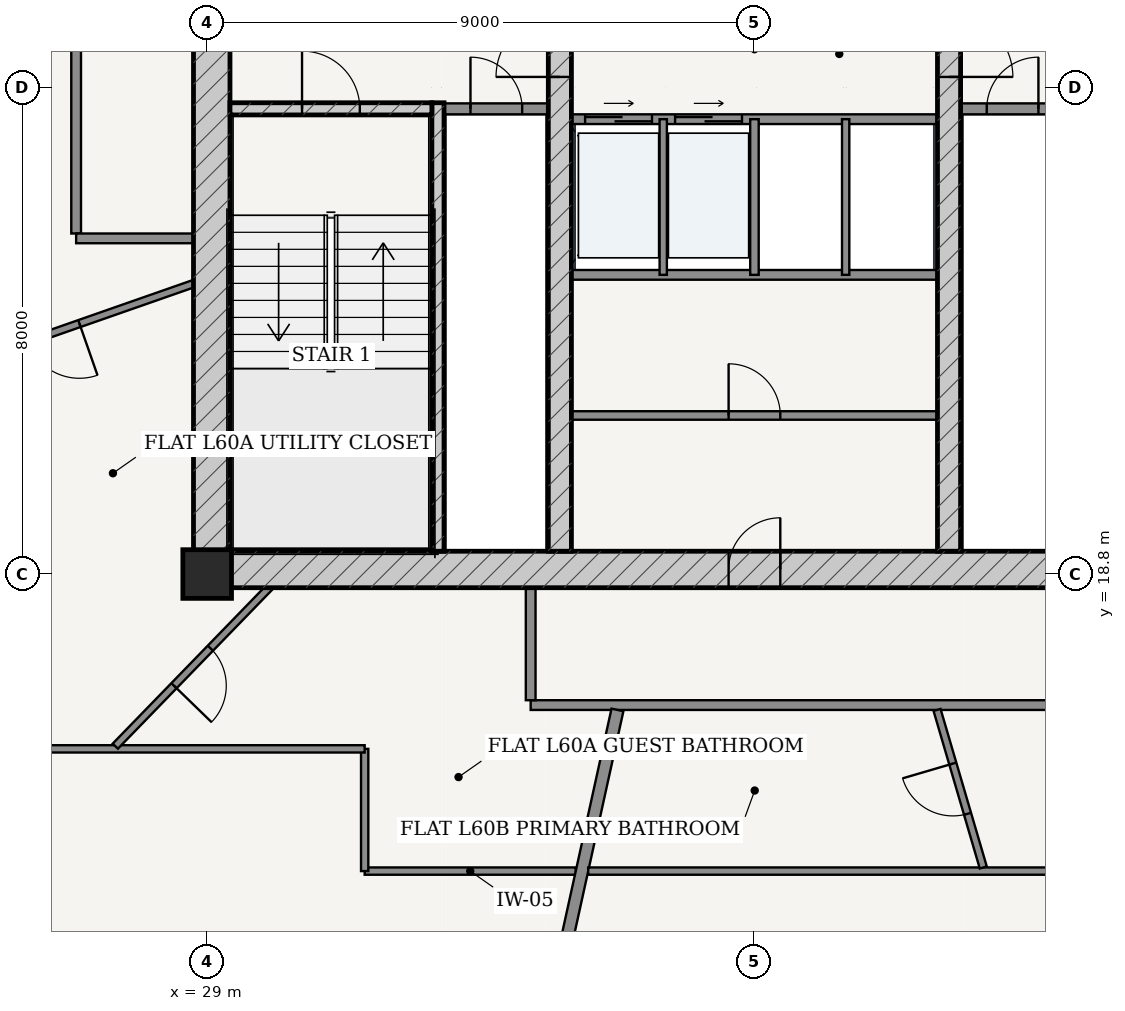
"""IFC4 building model, lengths in metres.
Left out: names, types, materials, properties, quantities, classifications, styles, units other than length and angle.
Written with IfcOpenShell. Run it as: python <this file> out.ifc"""

import sys

from ifc_helpers import new_model, si_unit, direction, frame, frame_2d, origin, origin_2d, place, context, subcontext, project, spatial, rectangle, extrude, source, transform, mapped, element, fill, save


model = new_model("IFC4")
c1 = context("Model", 3, precision=1e-05, world=origin(), true_north=direction((-0.2419218956, 0.970295726276)))
c2 = subcontext(c1, "Body", "Model", "MODEL_VIEW")
j1 = project(units=[si_unit("LENGTHUNIT", "METRE"), si_unit("PLANEANGLEUNIT", "RADIAN")], contexts=[c1])
p1 = place(None, origin())
s1 = spatial("IfcSite", under=j1, at=p1, CompositionType="ELEMENT")
p2 = place(p1, origin())
s2 = spatial("IfcBuilding", under=s1, at=p2, CompositionType="ELEMENT")
p3 = place(p2, frame((0.0, 0.0, 228.2)))
s3 = spatial("IfcBuildingStorey", under=s2, at=p3, CompositionType="ELEMENT", Elevation=228.2)
p4 = place(p3, frame((29.0, 18.8, 0.0), z_axis=(0.0, 0.0, 1.0), x_axis=(1.0, 0.0, 0.0)))
e1 = element("IfcColumn", 1, at=p4, inside=s3, PredefinedType="COLUMN", context=c2, shape_type="SweptSolid", body=[
    extrude(rectangle(XDim=0.8, YDim=0.8, at=origin_2d()), origin(), (0.0, 0.0, 1.0), 3.7),
])
p5 = place(p3, frame((28.775, 18.875, 0.0), z_axis=(0.0, 0.0, 1.0), x_axis=(1.0, 0.0, 0.0)))
e2 = element("IfcWall", 2, at=p5, inside=s3, PredefinedType="SHEAR", context=c2, shape_type="SweptSolid", body=[
    extrude(rectangle(XDim=18.45, YDim=0.6, at=frame_2d((9.225, 0.0))), origin(), (0.0, 0.0, 1.0), 3.435),
])
p6 = place(p5, frame((8.8, 0.0, 0.0)))
e3 = element("IfcOpeningElement", 3, at=p6, cuts=e2, PredefinedType="OPENING", context=c2, shape_type="SweptSolid", body=[
    extrude(rectangle(XDim=0.85, YDim=2.1, at=frame_2d((0.425, 1.05))), frame((0.0, 0.31, 0.0), z_axis=(0.0, -1.0, 0.0), x_axis=(1.0, 0.0, 0.0)), (0.0, 0.0, 1.0), 0.62),
])
p7 = place(p3, frame((29.075, 19.175, 0.0), z_axis=(0.0, 0.0, 1.0), x_axis=(0.0, 1.0, 0.0)))
e4 = element("IfcWall", 4, at=p7, inside=s3, PredefinedType="SHEAR", context=c2, shape_type="SweptSolid", body=[
    extrude(rectangle(XDim=15.25, YDim=0.6, at=frame_2d((7.625, 0.0))), origin(), (0.0, 0.0, 1.0), 3.435),
])
p8 = place(p7, frame((9.875, 0.0, 0.0)))
e5 = element("IfcOpeningElement", 5, at=p8, cuts=e4, PredefinedType="OPENING", context=c2, shape_type="SweptSolid", body=[
    extrude(rectangle(XDim=1.5, YDim=2.2, at=frame_2d((0.75, 1.1))), frame((0.0, 0.31, 0.0), z_axis=(0.0, -1.0, 0.0), x_axis=(1.0, 0.0, 0.0)), (0.0, 0.0, 1.0), 0.62),
])
p9 = place(p3, frame((32.795, 19.175, 0.0), z_axis=(0.0, 0.0, 1.0), x_axis=(0.0, 1.0, 0.0)))
e6 = element("IfcWall", 6, at=p9, inside=s3, PredefinedType="SOLIDWALL", context=c2, shape_type="SweptSolid", body=[
    extrude(rectangle(XDim=7.375, YDim=0.2, at=frame_2d((3.688, 0.0))), origin(), (0.0, 0.0, 1.0), 3.435),
])
p10 = place(p3, frame((29.375, 26.45, 0.0), z_axis=(0.0, 0.0, 1.0), x_axis=(1.0, 0.0, 0.0)))
e7 = element("IfcWall", 7, at=p10, inside=s3, PredefinedType="SOLIDWALL", context=c2, shape_type="SweptSolid", body=[
    extrude(rectangle(XDim=3.32, YDim=0.2, at=frame_2d((1.66, 0.0))), origin(), (0.0, 0.0, 1.0), 3.435),
])
p11 = place(p10, frame((1.185, 0.0, 0.0)))
e8 = element("IfcOpeningElement", 8, at=p11, cuts=e7, PredefinedType="OPENING", context=c2, shape_type="SweptSolid", body=[
    extrude(rectangle(XDim=0.95, YDim=2.15, at=frame_2d((0.475, 1.075))), frame((0.0, 0.11, 0.0), z_axis=(0.0, -1.0, 0.0), x_axis=(1.0, 0.0, 0.0)), (0.0, 0.0, 1.0), 0.22),
])
p12 = place(p3, frame((34.8, 19.175, 0.0), z_axis=(0.0, 0.0, 1.0), x_axis=(0.0, 1.0, 0.0)))
e9 = element("IfcWall", 9, at=p12, inside=s3, PredefinedType="SHEAR", context=c2, shape_type="SweptSolid", body=[
    extrude(rectangle(XDim=15.25, YDim=0.38, at=frame_2d((7.625, 0.0))), origin(), (0.0, 0.0, 1.0), 3.435),
])
p13 = place(p12, frame((7.8, 0.0, 0.0)))
e10 = element("IfcOpeningElement", 10, at=p13, cuts=e9, PredefinedType="OPENING", context=c2, shape_type="SweptSolid", body=[
    extrude(rectangle(XDim=1.05, YDim=2.15, at=frame_2d((0.525, 1.075))), frame((0.0, 0.2, 0.0), z_axis=(0.0, -1.0, 0.0), x_axis=(1.0, 0.0, 0.0)), (0.0, 0.0, 1.0), 0.4),
])
p14 = place(p3, frame((41.2, 19.175, 0.0), z_axis=(0.0, 0.0, 1.0), x_axis=(0.0, 1.0, 0.0)))
e11 = element("IfcWall", 11, at=p14, inside=s3, PredefinedType="SHEAR", context=c2, shape_type="SweptSolid", body=[
    extrude(rectangle(XDim=15.25, YDim=0.38, at=frame_2d((7.625, 0.0))), origin(), (0.0, 0.0, 1.0), 3.435),
])
p15 = place(p14, frame((7.8, 0.0, 0.0)))
e12 = element("IfcOpeningElement", 12, at=p15, cuts=e11, PredefinedType="OPENING", context=c2, shape_type="SweptSolid", body=[
    extrude(rectangle(XDim=1.05, YDim=2.15, at=frame_2d((0.525, 1.075))), frame((0.0, 0.2, 0.0), z_axis=(0.0, -1.0, 0.0), x_axis=(1.0, 0.0, 0.0)), (0.0, 0.0, 1.0), 0.4),
])
p16 = place(p3, frame((32.9, 26.45, 0.0), z_axis=(0.0, 0.0, 1.0), x_axis=(1.0, 0.0, 0.0)))
e13 = element("IfcWall", 13, at=p16, inside=s3, PredefinedType="PARTITIONING", context=c2, shape_type="SweptSolid", body=[
    extrude(rectangle(XDim=1.71, YDim=0.18, at=frame_2d((0.855, 0.0))), origin(), (0.0, 0.0, 1.0), 3.435),
])
p17 = place(p16, frame((0.43, 0.0, 0.0)))
e14 = element("IfcOpeningElement", 14, at=p17, cuts=e13, PredefinedType="OPENING", context=c2, shape_type="SweptSolid", body=[
    extrude(rectangle(XDim=0.85, YDim=2.1, at=frame_2d((0.425, 1.05))), frame((0.0, 0.1, 0.0), z_axis=(0.0, -1.0, 0.0), x_axis=(1.0, 0.0, 0.0)), (0.0, 0.0, 1.0), 0.2),
])
p18 = place(p3, frame((41.39, 26.45, 0.0), z_axis=(0.0, 0.0, 1.0), x_axis=(1.0, 0.0, 0.0)))
e15 = element("IfcWall", 15, at=p18, inside=s3, PredefinedType="PARTITIONING", context=c2, shape_type="SweptSolid", body=[
    extrude(rectangle(XDim=1.71, YDim=0.18, at=frame_2d((0.855, 0.0))), origin(), (0.0, 0.0, 1.0), 3.435),
])
p19 = place(p18, frame((0.43, 0.0, 0.0)))
e16 = element("IfcOpeningElement", 16, at=p19, cuts=e15, PredefinedType="OPENING", context=c2, shape_type="SweptSolid", body=[
    extrude(rectangle(XDim=0.85, YDim=2.1, at=frame_2d((0.425, 1.05))), frame((0.0, 0.1, 0.0), z_axis=(0.0, -1.0, 0.0), x_axis=(1.0, 0.0, 0.0)), (0.0, 0.0, 1.0), 0.2),
])
p20 = place(p3, frame((34.99, 26.28, 0.0), z_axis=(0.0, 0.0, 1.0), x_axis=(1.0, 0.0, 0.0)))
e17 = element("IfcWall", 17, at=p20, inside=s3, PredefinedType="PARTITIONING", context=c2, shape_type="SweptSolid", body=[
    extrude(rectangle(XDim=6.02, YDim=0.16, at=frame_2d((3.01, 0.0))), origin(), (0.0, 0.0, 1.0), 3.435),
])
p21 = place(p20, frame((0.225, 0.0, 0.0)))
e18 = element("IfcOpeningElement", 18, at=p21, cuts=e17, PredefinedType="OPENING", context=c2, shape_type="SweptSolid", body=[
    extrude(rectangle(XDim=1.1, YDim=2.2, at=frame_2d((0.55, 1.1))), frame((0.0, 0.09, 0.0), z_axis=(0.0, -1.0, 0.0), x_axis=(1.0, 0.0, 0.0)), (0.0, 0.0, 1.0), 0.18),
])
p22 = place(p20, frame((1.705, 0.0, 0.0)))
e19 = element("IfcOpeningElement", 19, at=p22, cuts=e17, PredefinedType="OPENING", context=c2, shape_type="SweptSolid", body=[
    extrude(rectangle(XDim=1.1, YDim=2.2, at=frame_2d((0.55, 1.1))), frame((0.0, 0.09, 0.0), z_axis=(0.0, -1.0, 0.0), x_axis=(1.0, 0.0, 0.0)), (0.0, 0.0, 1.0), 0.18),
])
p23 = place(p3, frame((34.99, 23.72, 0.0), z_axis=(0.0, 0.0, 1.0), x_axis=(1.0, 0.0, 0.0)))
e20 = element("IfcWall", 20, at=p23, inside=s3, PredefinedType="PARTITIONING", context=c2, shape_type="SweptSolid", body=[
    extrude(rectangle(XDim=6.02, YDim=0.16, at=frame_2d((3.01, 0.0))), origin(), (0.0, 0.0, 1.0), 3.435),
])
p24 = place(p3, frame((36.5, 23.72, 0.0), z_axis=(0.0, 0.0, 1.0), x_axis=(0.0, 1.0, 0.0)))
e21 = element("IfcWall", 21, at=p24, inside=s3, PredefinedType="PARTITIONING", context=c2, shape_type="SweptSolid", body=[
    extrude(rectangle(XDim=2.56, YDim=0.12, at=frame_2d((1.28, 0.0))), origin(), (0.0, 0.0, 1.0), 3.435),
])
p25 = place(p3, frame((38.0, 23.72, 0.0), z_axis=(0.0, 0.0, 1.0), x_axis=(0.0, 1.0, 0.0)))
e22 = element("IfcWall", 22, at=p25, inside=s3, PredefinedType="PARTITIONING", context=c2, shape_type="SweptSolid", body=[
    extrude(rectangle(XDim=2.56, YDim=0.14, at=frame_2d((1.28, 0.0))), origin(), (0.0, 0.0, 1.0), 3.435),
])
p26 = place(p3, frame((39.5, 23.72, 0.0), z_axis=(0.0, 0.0, 1.0), x_axis=(0.0, 1.0, 0.0)))
e23 = element("IfcWall", 23, at=p26, inside=s3, PredefinedType="PARTITIONING", context=c2, shape_type="SweptSolid", body=[
    extrude(rectangle(XDim=2.56, YDim=0.12, at=frame_2d((1.28, 0.0))), origin(), (0.0, 0.0, 1.0), 3.435),
])
p27 = place(p3, frame((34.99, 21.407, 0.0), z_axis=(0.0, 0.0, 1.0), x_axis=(1.0, 0.0, 0.0)))
e24 = element("IfcWall", 24, at=p27, inside=s3, PredefinedType="PARTITIONING", context=c2, shape_type="SweptSolid", body=[
    extrude(rectangle(XDim=6.02, YDim=0.14, at=frame_2d((3.01, 0.0))), origin(), (0.0, 0.0, 1.0), 3.435),
])
p28 = place(p27, frame((2.585, 0.0, 0.0)))
e25 = element("IfcOpeningElement", 25, at=p28, cuts=e24, PredefinedType="OPENING", context=c2, shape_type="SweptSolid", body=[
    extrude(rectangle(XDim=0.85, YDim=2.1, at=frame_2d((0.425, 1.05))), frame((0.0, 0.08, 0.0), z_axis=(0.0, -1.0, 0.0), x_axis=(1.0, 0.0, 0.0)), (0.0, 0.0, 1.0), 0.16),
])
p29 = place(p3, frame((26.845, 24.4, 0.0), z_axis=(0.0, 0.0, 1.0), x_axis=(0.0, 1.0, 0.0)))
e26 = element("IfcWall", 26, at=p29, inside=s3, PredefinedType="PARTITIONING", context=c2, shape_type="SweptSolid", body=[
    extrude(rectangle(XDim=10.625, YDim=0.16, at=frame_2d((5.312, 0.0))), origin(), (0.0, 0.0, 1.0), 2.951),
])
p30 = place(p3, frame((26.845, 24.32, 0.0), z_axis=(0.0, 0.0, 1.0), x_axis=(1.0, 0.0, 0.0)))
e27 = element("IfcWall", 27, at=p30, inside=s3, PredefinedType="PARTITIONING", context=c2, shape_type="SweptSolid", body=[
    extrude(rectangle(XDim=1.93, YDim=0.16, at=frame_2d((0.965, 0.0))), origin(), (0.0, 0.0, 1.0), 3.435),
])
p31 = place(p3, frame((34.32, 16.645, 0.0), z_axis=(0.0, 0.0, 1.0), x_axis=(1.0, 0.0, 0.0)))
e28 = element("IfcWall", 28, at=p31, inside=s3, PredefinedType="PARTITIONING", context=c2, shape_type="SweptSolid", body=[
    extrude(rectangle(XDim=14.835, YDim=0.16, at=frame_2d((7.417, 0.0))), origin(), (0.0, 0.0, 1.0), 2.951),
])
p32 = place(p31, frame((10.135, 0.0, 0.0)))
e29 = element("IfcOpeningElement", 29, at=p32, cuts=e28, PredefinedType="OPENING", context=c2, shape_type="SweptSolid", body=[
    extrude(rectangle(XDim=0.98, YDim=2.2, at=frame_2d((0.49, 1.1))), frame((0.0, 0.09, 0.0), z_axis=(0.0, -1.0, 0.0), x_axis=(1.0, 0.0, 0.0)), (0.0, 0.0, 1.0), 0.18),
])
p33 = place(p3, frame((34.32, 16.725, 0.0), z_axis=(0.0, 0.0, 1.0), x_axis=(0.0, 1.0, 0.0)))
e30 = element("IfcWall", 30, at=p33, inside=s3, PredefinedType="PARTITIONING", context=c2, shape_type="SweptSolid", body=[
    extrude(rectangle(XDim=1.85, YDim=0.16, at=frame_2d((0.925, 0.0))), origin(), (0.0, 0.0, 1.0), 3.435),
])
p34 = place(p3, frame((35.062, 13.915, 0.0), z_axis=(0.0, 0.0, 1.0), x_axis=(-1.0, 0.0, 0.0)))
e31 = element("IfcWall", 31, at=p34, inside=s3, PredefinedType="PARTITIONING", context=c2, shape_type="SweptSolid", body=[
    extrude(rectangle(XDim=3.472, YDim=0.12, at=frame_2d((1.736, 0.0))), origin(), (0.0, 0.0, 1.0), 2.951),
])
p35 = place(p3, frame((31.59, 13.915, 0.0), z_axis=(0.0, 0.0, 1.0), x_axis=(0.0, 1.0, 0.0)))
e32 = element("IfcWall", 32, at=p35, inside=s3, PredefinedType="PARTITIONING", context=c2, shape_type="SweptSolid", body=[
    extrude(rectangle(XDim=2.01, YDim=0.12, at=frame_2d((1.005, 0.0))), origin(), (0.0, 0.0, 1.0), 3.11),
])
p36 = place(p3, frame((31.59, 15.925, 0.0), z_axis=(0.0, 0.0, 1.0), x_axis=(-1.0, 0.0, 0.0)))
e33 = element("IfcWall", 33, at=p36, inside=s3, PredefinedType="PARTITIONING", context=c2, shape_type="SweptSolid", body=[
    extrude(rectangle(XDim=5.465, YDim=0.12, at=frame_2d((2.732, 0.0))), origin(), (0.0, 0.0, 1.0), 2.951),
])
p37 = place(p3, frame((28.775, 23.575, 0.0), z_axis=(0.0, 0.0, 1.0), x_axis=(-0.943974645063, -0.330017983569, 0.0)))
e34 = element("IfcWall", 34, at=p37, inside=s3, PredefinedType="PARTITIONING", context=c2, shape_type="SweptSolid", body=[
    extrude(rectangle(XDim=4.875, YDim=0.12, at=frame_2d((2.437, 0.0))), origin(), (0.0, 0.0, 1.0), 3.11),
])
p38 = place(p37, frame((1.987, 0.0, 0.0)))
e35 = element("IfcOpeningElement", 35, at=p38, cuts=e34, PredefinedType="OPENING", context=c2, shape_type="SweptSolid", body=[
    extrude(rectangle(XDim=0.9, YDim=2.15, at=frame_2d((0.45, 1.075))), frame((0.0, 0.07, 0.0), z_axis=(0.0, -1.0, 0.0), x_axis=(1.0, 0.0, 0.0)), (0.0, 0.0, 1.0), 0.14),
])
p39 = place(p3, frame((30.018, 18.575, 0.0), z_axis=(0.0, 0.0, 1.0), x_axis=(-0.696436677683, -0.717618250867, 0.0)))
e36 = element("IfcWall", 36, at=p39, inside=s3, PredefinedType="PARTITIONING", context=c2, shape_type="SweptSolid", body=[
    extrude(rectangle(XDim=3.631, YDim=0.12, at=frame_2d((1.815, 0.0))), origin(), (0.0, 0.0, 1.0), 2.951),
])
p40 = place(p39, frame((1.385, 0.0, 0.0)))
e37 = element("IfcOpeningElement", 37, at=p40, cuts=e36, PredefinedType="OPENING", context=c2, shape_type="SweptSolid", body=[
    extrude(rectangle(XDim=0.86, YDim=2.15, at=frame_2d((0.43, 1.075))), frame((0.0, 0.07, 0.0), z_axis=(0.0, -1.0, 0.0), x_axis=(1.0, 0.0, 0.0)), (0.0, 0.0, 1.0), 0.14),
])
p41 = place(p3, frame((35.747, 16.565, 0.0), z_axis=(0.0, 0.0, 1.0), x_axis=(-0.214957946814, -0.976623305631, 0.0)))
e38 = element("IfcWall", 38, at=p41, inside=s3, PredefinedType="PARTITIONING", context=c2, shape_type="SweptSolid", body=[
    extrude(rectangle(XDim=9.202, YDim=0.2, at=frame_2d((4.601, 0.0))), origin(), (0.0, 0.0, 1.0), 2.951),
])
p42 = place(p3, frame((51.885, 13.915, 0.0), z_axis=(0.0, 0.0, 1.0), x_axis=(-1.0, 0.0, 0.0)))
e39 = element("IfcWall", 39, at=p42, inside=s3, PredefinedType="PARTITIONING", context=c2, shape_type="SweptSolid", body=[
    extrude(rectangle(XDim=16.619, YDim=0.12, at=frame_2d((8.31, 0.0))), origin(), (0.0, 0.0, 1.0), 2.951),
])
p43 = place(p42, frame((6.797, 0.0, 0.0)))
e40 = element("IfcOpeningElement", 40, at=p43, cuts=e39, PredefinedType="OPENING", context=c2, shape_type="SweptSolid", body=[
    extrude(rectangle(XDim=0.9, YDim=2.15, at=frame_2d((0.45, 1.075))), frame((0.0, 0.07, 0.0), z_axis=(0.0, -1.0, 0.0), x_axis=(1.0, 0.0, 0.0)), (0.0, 0.0, 1.0), 0.14),
])
p44 = place(p42, frame((1.849, 0.0, 0.0)))
e41 = element("IfcOpeningElement", 41, at=p44, cuts=e39, PredefinedType="OPENING", context=c2, shape_type="SweptSolid", body=[
    extrude(rectangle(XDim=0.9, YDim=2.15, at=frame_2d((0.45, 1.075))), frame((0.0, 0.07, 0.0), z_axis=(0.0, -1.0, 0.0), x_axis=(1.0, 0.0, 0.0)), (0.0, 0.0, 1.0), 0.14),
])
p45 = place(p3, frame((41.003, 16.565, 0.0), z_axis=(0.0, 0.0, 1.0), x_axis=(0.281617901256, -0.959526632091, 0.0)))
e42 = element("IfcWall", 42, at=p45, inside=s3, PredefinedType="PARTITIONING", context=c2, shape_type="SweptSolid", body=[
    extrude(rectangle(XDim=2.7, YDim=0.12, at=frame_2d((1.35, 0.0))), origin(), (0.0, 0.0, 1.0), 3.11),
])
p46 = place(p45, frame((0.92, 0.0, 0.0)))
e43 = element("IfcOpeningElement", 43, at=p46, cuts=e42, PredefinedType="OPENING", context=c2, shape_type="SweptSolid", body=[
    extrude(rectangle(XDim=0.86, YDim=2.15, at=frame_2d((0.43, 1.075))), frame((0.0, 0.07, 0.0), z_axis=(0.0, -1.0, 0.0), x_axis=(1.0, 0.0, 0.0)), (0.0, 0.0, 1.0), 0.14),
])
m1 = source(origin(), c2, "Body", "SweptSolid", [
    extrude(rectangle(XDim=1.05, YDim=2.15, at=frame_2d((0.525, 1.075))), frame((0.0, 0.025, 0.0), z_axis=(0.0, -1.0, 0.0), x_axis=(1.0, 0.0, 0.0)), (0.0, 0.0, 1.0), 0.05),
])
p47 = place(p13, origin())
e44 = element("IfcDoor", 44, at=p47, inside=s3, OperationType="SINGLE_SWING_LEFT", PredefinedType="DOOR", context=c2, shape_type="MappedRepresentation", body=[
    mapped(m1, transform((0.0, 0.0, 0.0), scale=1.0)),
])
fill(e10, e44)
p48 = place(p15, frame((1.05, 0.0, 0.0), z_axis=(0.0, 0.0, 1.0), x_axis=(-1.0, 0.0, 0.0)))
e45 = element("IfcDoor", 45, at=p48, inside=s3, OperationType="SINGLE_SWING_RIGHT", PredefinedType="DOOR", context=c2, shape_type="MappedRepresentation", body=[
    mapped(m1, transform((0.0, 0.0, 0.0), scale=1.0)),
])
fill(e12, e45)
m2 = source(origin(), c2, "Body", "SweptSolid", [
    extrude(rectangle(XDim=0.95, YDim=2.15, at=frame_2d((0.475, 1.075))), frame((0.0, 0.025, 0.0), z_axis=(0.0, -1.0, 0.0), x_axis=(1.0, 0.0, 0.0)), (0.0, 0.0, 1.0), 0.05),
])
p49 = place(p11, origin())
e46 = element("IfcDoor", 46, at=p49, inside=s3, OperationType="SINGLE_SWING_LEFT", PredefinedType="DOOR", context=c2, shape_type="MappedRepresentation", body=[
    mapped(m2, transform((0.0, 0.0, 0.0), scale=1.0)),
])
fill(e8, e46)
m3 = source(origin(), c2, "Body", "SweptSolid", [
    extrude(rectangle(XDim=0.85, YDim=2.1, at=frame_2d((0.425, 1.05))), frame((0.0, 0.025, 0.0), z_axis=(0.0, -1.0, 0.0), x_axis=(1.0, 0.0, 0.0)), (0.0, 0.0, 1.0), 0.05),
])
p50 = place(p17, origin())
e47 = element("IfcDoor", 47, at=p50, inside=s3, OperationType="SINGLE_SWING_LEFT", PredefinedType="DOOR", context=c2, shape_type="MappedRepresentation", body=[
    mapped(m3, transform((0.0, 0.0, 0.0), scale=1.0)),
])
fill(e14, e47)
p51 = place(p19, origin())
e48 = element("IfcDoor", 48, at=p51, inside=s3, OperationType="SINGLE_SWING_RIGHT", PredefinedType="DOOR", context=c2, shape_type="MappedRepresentation", body=[
    mapped(m3, transform((0.0, 0.0, 0.0), scale=1.0)),
])
fill(e16, e48)
p52 = place(p6, origin())
e49 = element("IfcDoor", 49, at=p52, inside=s3, OperationType="SINGLE_SWING_RIGHT", PredefinedType="DOOR", context=c2, shape_type="MappedRepresentation", body=[
    mapped(m3, transform((0.0, 0.0, 0.0), scale=1.0)),
])
fill(e3, e49)
p53 = place(p28, origin())
e50 = element("IfcDoor", 50, at=p53, inside=s3, OperationType="SINGLE_SWING_LEFT", PredefinedType="DOOR", context=c2, shape_type="MappedRepresentation", body=[
    mapped(m3, transform((0.0, 0.0, 0.0), scale=1.0)),
])
fill(e25, e50)
m4 = source(origin(), c2, "Body", "SweptSolid", [
    extrude(rectangle(XDim=1.1, YDim=2.2, at=frame_2d((0.55, 1.1))), frame((0.0, 0.025, 0.0), z_axis=(0.0, -1.0, 0.0), x_axis=(1.0, 0.0, 0.0)), (0.0, 0.0, 1.0), 0.05),
])
p54 = place(p21, origin())
e51 = element("IfcDoor", 51, at=p54, inside=s3, OperationType="DOUBLE_DOOR_SLIDING", PredefinedType="DOOR", context=c2, shape_type="MappedRepresentation", body=[
    mapped(m4, transform((0.0, 0.0, 0.0), scale=1.0)),
])
fill(e18, e51)
p55 = place(p22, origin())
e52 = element("IfcDoor", 52, at=p55, inside=s3, OperationType="DOUBLE_DOOR_SLIDING", PredefinedType="DOOR", context=c2, shape_type="MappedRepresentation", body=[
    mapped(m4, transform((0.0, 0.0, 0.0), scale=1.0)),
])
fill(e19, e52)
m5 = source(origin(), c2, "Body", "SweptSolid", [
    extrude(rectangle(XDim=0.9, YDim=2.15, at=frame_2d((0.45, 1.075))), frame((0.0, 0.025, 0.0), z_axis=(0.0, -1.0, 0.0), x_axis=(1.0, 0.0, 0.0)), (0.0, 0.0, 1.0), 0.05),
])
p56 = place(p38, origin())
e53 = element("IfcDoor", 53, at=p56, inside=s3, OperationType="SINGLE_SWING_LEFT", PredefinedType="DOOR", context=c2, shape_type="MappedRepresentation", body=[
    mapped(m5, transform((0.0, 0.0, 0.0), scale=1.0)),
])
fill(e35, e53)
m6 = source(origin(), c2, "Body", "SweptSolid", [
    extrude(rectangle(XDim=0.86, YDim=2.15, at=frame_2d((0.43, 1.075))), frame((0.0, 0.025, 0.0), z_axis=(0.0, -1.0, 0.0), x_axis=(1.0, 0.0, 0.0)), (0.0, 0.0, 1.0), 0.05),
])
p57 = place(p40, origin())
e54 = element("IfcDoor", 54, at=p57, inside=s3, OperationType="SINGLE_SWING_RIGHT", PredefinedType="DOOR", context=c2, shape_type="MappedRepresentation", body=[
    mapped(m6, transform((0.0, 0.0, 0.0), scale=1.0)),
])
fill(e37, e54)
p58 = place(p46, frame((0.86, 0.0, 0.0), z_axis=(0.0, 0.0, 1.0), x_axis=(-1.0, 0.0, 0.0)))
e55 = element("IfcDoor", 55, at=p58, inside=s3, OperationType="SINGLE_SWING_RIGHT", PredefinedType="DOOR", context=c2, shape_type="MappedRepresentation", body=[
    mapped(m6, transform((0.0, 0.0, 0.0), scale=1.0)),
])
fill(e43, e55)
save(model, sys.argv[1])
